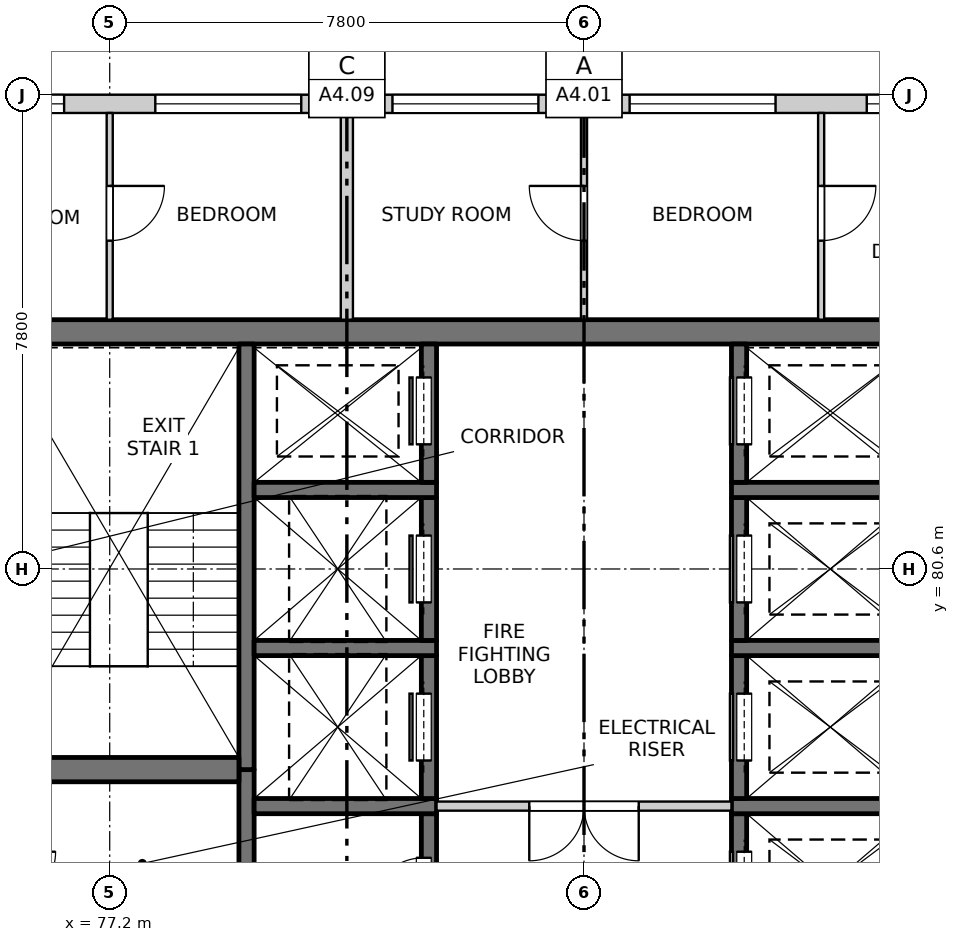
"""IFC4 building model, lengths in metres.
Left out: names, types, materials, properties, quantities, classifications, styles, units other than length and angle.
Written with IfcOpenShell. Run it as: python <this file> out.ifc"""

import sys

from ifc_helpers import new_model, si_unit, direction, frame, frame_2d, origin, place, context, subcontext, project, spatial, rectangle, extrude, element, fill, save


model = new_model("IFC4")
c1 = context("Model", 3, precision=1e-05, world=origin(), true_north=direction((0.0, 1.0)))
c2 = subcontext(c1, "Body", "Model", "MODEL_VIEW")
j1 = project(units=[si_unit("LENGTHUNIT", "METRE"), si_unit("PLANEANGLEUNIT", "RADIAN")], contexts=[c1])
p1 = place(None, origin())
s1 = spatial("IfcSite", under=j1, at=p1, CompositionType="ELEMENT")
p2 = place(p1, origin())
s2 = spatial("IfcBuilding", under=s1, at=p2, CompositionType="ELEMENT")
p3 = place(p2, frame((0.0, 0.0, 204.1)))
s3 = spatial("IfcBuildingStorey", under=s2, at=p3, CompositionType="ELEMENT", Elevation=204.1)
p4 = place(p3, frame((75.45, 84.5, -0.25), z_axis=(0.0, 0.0, 1.0), x_axis=(1.0, 0.0, 0.0)))
e1 = element("IfcWall", 1, at=p4, inside=s3, PredefinedType="SOLIDWALL", context=c2, shape_type="SweptSolid", body=[
    extrude(rectangle(XDim=19.1, YDim=0.4, at=frame_2d((9.55, 0.0))), origin(), (0.0, 0.0, 1.0), 3.4),
])
p5 = place(p3, frame((79.45, 60.975, -0.25), z_axis=(0.0, 0.0, 1.0), x_axis=(0.0, 1.0, 0.0)))
e2 = element("IfcWall", 2, at=p5, inside=s3, PredefinedType="SOLIDWALL", context=c2, shape_type="SweptSolid", body=[
    extrude(rectangle(XDim=16.325, YDim=0.25, at=frame_2d((8.163, 0.0))), origin(), (0.0, 0.0, 1.0), 3.4),
])
p6 = place(p3, frame((79.45, 77.3, -0.25), z_axis=(0.0, 0.0, 1.0), x_axis=(0.0, 1.0, 0.0)))
e3 = element("IfcWall", 3, at=p6, inside=s3, PredefinedType="SOLIDWALL", context=c2, shape_type="SweptSolid", body=[
    extrude(rectangle(XDim=7.0, YDim=0.25, at=frame_2d((3.5, 0.0))), origin(), (0.0, 0.0, 1.0), 3.4),
])
p7 = place(p3, frame((82.45, 74.225, -0.25), z_axis=(0.0, 0.0, 1.0), x_axis=(0.0, 1.0, 0.0)))
e4 = element("IfcWall", 4, at=p7, inside=s3, PredefinedType="SOLIDWALL", context=c2, shape_type="SweptSolid", body=[
    extrude(rectangle(XDim=2.35, YDim=0.25, at=frame_2d((1.175, 0.0))), origin(), (0.0, 0.0, 1.0), 3.4),
])
p8 = place(p7, frame((0.725, 0.0, 0.25)))
e5 = element("IfcOpeningElement", 5, at=p8, cuts=e4, PredefinedType="OPENING", context=c2, shape_type="SweptSolid", body=[
    extrude(rectangle(XDim=0.9, YDim=2.1, at=frame_2d((0.45, 1.05))), frame((0.0, 0.135, 0.0), z_axis=(0.0, -1.0, 0.0), x_axis=(1.0, 0.0, 0.0)), (0.0, 0.0, 1.0), 0.27),
])
p9 = place(p3, frame((79.575, 76.7, -0.25), z_axis=(0.0, 0.0, 1.0), x_axis=(1.0, 0.0, 0.0)))
e6 = element("IfcWall", 6, at=p9, inside=s3, PredefinedType="SOLIDWALL", context=c2, shape_type="SweptSolid", body=[
    extrude(rectangle(XDim=3.0, YDim=0.25, at=frame_2d((1.5, 0.0))), origin(), (0.0, 0.0, 1.0), 3.4),
])
p10 = place(p3, frame((82.45, 76.825, -0.25), z_axis=(0.0, 0.0, 1.0), x_axis=(0.0, 1.0, 0.0)))
e7 = element("IfcWall", 7, at=p10, inside=s3, PredefinedType="SOLIDWALL", context=c2, shape_type="SweptSolid", body=[
    extrude(rectangle(XDim=2.35, YDim=0.25, at=frame_2d((1.175, 0.0))), origin(), (0.0, 0.0, 1.0), 3.4),
])
p11 = place(p10, frame((0.625, 0.0, 0.25)))
e8 = element("IfcOpeningElement", 8, at=p11, cuts=e7, PredefinedType="OPENING", context=c2, shape_type="SweptSolid", body=[
    extrude(rectangle(XDim=1.1, YDim=2.1, at=frame_2d((0.55, 1.05))), frame((0.0, 0.135, 0.0), z_axis=(0.0, -1.0, 0.0), x_axis=(1.0, 0.0, 0.0)), (0.0, 0.0, 1.0), 0.27),
])
p12 = place(p3, frame((79.575, 79.3, -0.25), z_axis=(0.0, 0.0, 1.0), x_axis=(1.0, 0.0, 0.0)))
e9 = element("IfcWall", 9, at=p12, inside=s3, PredefinedType="SOLIDWALL", context=c2, shape_type="SweptSolid", body=[
    extrude(rectangle(XDim=3.0, YDim=0.25, at=frame_2d((1.5, 0.0))), origin(), (0.0, 0.0, 1.0), 3.4),
])
p13 = place(p3, frame((82.45, 79.425, -0.25), z_axis=(0.0, 0.0, 1.0), x_axis=(0.0, 1.0, 0.0)))
e10 = element("IfcWall", 10, at=p13, inside=s3, PredefinedType="SOLIDWALL", context=c2, shape_type="SweptSolid", body=[
    extrude(rectangle(XDim=2.35, YDim=0.25, at=frame_2d((1.175, 0.0))), origin(), (0.0, 0.0, 1.0), 3.4),
])
p14 = place(p13, frame((0.625, 0.0, 0.25)))
e11 = element("IfcOpeningElement", 11, at=p14, cuts=e10, PredefinedType="OPENING", context=c2, shape_type="SweptSolid", body=[
    extrude(rectangle(XDim=1.1, YDim=2.1, at=frame_2d((0.55, 1.05))), frame((0.0, 0.135, 0.0), z_axis=(0.0, -1.0, 0.0), x_axis=(1.0, 0.0, 0.0)), (0.0, 0.0, 1.0), 0.27),
])
p15 = place(p3, frame((79.575, 81.9, -0.25), z_axis=(0.0, 0.0, 1.0), x_axis=(1.0, 0.0, 0.0)))
e12 = element("IfcWall", 12, at=p15, inside=s3, PredefinedType="SOLIDWALL", context=c2, shape_type="SweptSolid", body=[
    extrude(rectangle(XDim=3.0, YDim=0.25, at=frame_2d((1.5, 0.0))), origin(), (0.0, 0.0, 1.0), 3.4),
])
p16 = place(p3, frame((82.45, 82.025, -0.25), z_axis=(0.0, 0.0, 1.0), x_axis=(0.0, 1.0, 0.0)))
e13 = element("IfcWall", 13, at=p16, inside=s3, PredefinedType="SOLIDWALL", context=c2, shape_type="SweptSolid", body=[
    extrude(rectangle(XDim=2.275, YDim=0.25, at=frame_2d((1.138, 0.0))), origin(), (0.0, 0.0, 1.0), 3.4),
])
p17 = place(p16, frame((0.625, 0.0, 0.25)))
e14 = element("IfcOpeningElement", 14, at=p17, cuts=e13, PredefinedType="OPENING", context=c2, shape_type="SweptSolid", body=[
    extrude(rectangle(XDim=1.1, YDim=2.1, at=frame_2d((0.55, 1.05))), frame((0.0, 0.135, 0.0), z_axis=(0.0, -1.0, 0.0), x_axis=(1.0, 0.0, 0.0)), (0.0, 0.0, 1.0), 0.27),
])
p18 = place(p3, frame((87.55, 74.225, -0.25), z_axis=(0.0, 0.0, 1.0), x_axis=(0.0, 1.0, 0.0)))
e15 = element("IfcWall", 15, at=p18, inside=s3, PredefinedType="SOLIDWALL", context=c2, shape_type="SweptSolid", body=[
    extrude(rectangle(XDim=2.35, YDim=0.25, at=frame_2d((1.175, 0.0))), origin(), (0.0, 0.0, 1.0), 3.4),
])
p19 = place(p18, frame((0.625, 0.0, 0.25)))
e16 = element("IfcOpeningElement", 16, at=p19, cuts=e15, PredefinedType="OPENING", context=c2, shape_type="SweptSolid", body=[
    extrude(rectangle(XDim=1.1, YDim=2.1, at=frame_2d((0.55, 1.05))), frame((0.0, 0.135, 0.0), z_axis=(0.0, -1.0, 0.0), x_axis=(1.0, 0.0, 0.0)), (0.0, 0.0, 1.0), 0.27),
])
p20 = place(p3, frame((87.425, 76.7, -0.25), z_axis=(0.0, 0.0, 1.0), x_axis=(1.0, 0.0, 0.0)))
e17 = element("IfcWall", 17, at=p20, inside=s3, PredefinedType="SOLIDWALL", context=c2, shape_type="SweptSolid", body=[
    extrude(rectangle(XDim=3.0, YDim=0.25, at=frame_2d((1.5, 0.0))), origin(), (0.0, 0.0, 1.0), 3.4),
])
p21 = place(p3, frame((87.55, 76.825, -0.25), z_axis=(0.0, 0.0, 1.0), x_axis=(0.0, 1.0, 0.0)))
e18 = element("IfcWall", 18, at=p21, inside=s3, PredefinedType="SOLIDWALL", context=c2, shape_type="SweptSolid", body=[
    extrude(rectangle(XDim=2.35, YDim=0.25, at=frame_2d((1.175, 0.0))), origin(), (0.0, 0.0, 1.0), 3.4),
])
p22 = place(p21, frame((0.625, 0.0, 0.25)))
e19 = element("IfcOpeningElement", 19, at=p22, cuts=e18, PredefinedType="OPENING", context=c2, shape_type="SweptSolid", body=[
    extrude(rectangle(XDim=1.1, YDim=2.1, at=frame_2d((0.55, 1.05))), frame((0.0, 0.135, 0.0), z_axis=(0.0, -1.0, 0.0), x_axis=(1.0, 0.0, 0.0)), (0.0, 0.0, 1.0), 0.27),
])
p23 = place(p3, frame((87.425, 79.3, -0.25), z_axis=(0.0, 0.0, 1.0), x_axis=(1.0, 0.0, 0.0)))
e20 = element("IfcWall", 20, at=p23, inside=s3, PredefinedType="SOLIDWALL", context=c2, shape_type="SweptSolid", body=[
    extrude(rectangle(XDim=3.0, YDim=0.25, at=frame_2d((1.5, 0.0))), origin(), (0.0, 0.0, 1.0), 3.4),
])
p24 = place(p3, frame((87.55, 79.425, -0.25), z_axis=(0.0, 0.0, 1.0), x_axis=(0.0, 1.0, 0.0)))
e21 = element("IfcWall", 21, at=p24, inside=s3, PredefinedType="SOLIDWALL", context=c2, shape_type="SweptSolid", body=[
    extrude(rectangle(XDim=2.35, YDim=0.25, at=frame_2d((1.175, 0.0))), origin(), (0.0, 0.0, 1.0), 3.4),
])
p25 = place(p24, frame((0.625, 0.0, 0.25)))
e22 = element("IfcOpeningElement", 22, at=p25, cuts=e21, PredefinedType="OPENING", context=c2, shape_type="SweptSolid", body=[
    extrude(rectangle(XDim=1.1, YDim=2.1, at=frame_2d((0.55, 1.05))), frame((0.0, 0.135, 0.0), z_axis=(0.0, -1.0, 0.0), x_axis=(1.0, 0.0, 0.0)), (0.0, 0.0, 1.0), 0.27),
])
p26 = place(p3, frame((87.425, 81.9, -0.25), z_axis=(0.0, 0.0, 1.0), x_axis=(1.0, 0.0, 0.0)))
e23 = element("IfcWall", 23, at=p26, inside=s3, PredefinedType="SOLIDWALL", context=c2, shape_type="SweptSolid", body=[
    extrude(rectangle(XDim=3.0, YDim=0.25, at=frame_2d((1.5, 0.0))), origin(), (0.0, 0.0, 1.0), 3.4),
])
p27 = place(p3, frame((87.55, 82.025, -0.25), z_axis=(0.0, 0.0, 1.0), x_axis=(0.0, 1.0, 0.0)))
e24 = element("IfcWall", 24, at=p27, inside=s3, PredefinedType="SOLIDWALL", context=c2, shape_type="SweptSolid", body=[
    extrude(rectangle(XDim=2.275, YDim=0.25, at=frame_2d((1.138, 0.0))), origin(), (0.0, 0.0, 1.0), 3.4),
])
p28 = place(p27, frame((0.625, 0.0, 0.25)))
e25 = element("IfcOpeningElement", 25, at=p28, cuts=e24, PredefinedType="OPENING", context=c2, shape_type="SweptSolid", body=[
    extrude(rectangle(XDim=1.1, YDim=2.1, at=frame_2d((0.55, 1.05))), frame((0.0, 0.135, 0.0), z_axis=(0.0, -1.0, 0.0), x_axis=(1.0, 0.0, 0.0)), (0.0, 0.0, 1.0), 0.27),
])
p29 = place(p3, frame((75.45, 77.3, -0.25), z_axis=(0.0, 0.0, 1.0), x_axis=(1.0, 0.0, 0.0)))
e26 = element("IfcWall", 26, at=p29, inside=s3, PredefinedType="SOLIDWALL", context=c2, shape_type="SweptSolid", body=[
    extrude(rectangle(XDim=3.875, YDim=0.4, at=frame_2d((1.938, 0.0))), origin(), (0.0, 0.0, 1.0), 3.4),
])
p30 = place(p3, frame((73.7, 88.25, 0.0), z_axis=(0.0, 0.0, 1.0), x_axis=(1.0, 0.0, 0.0)))
e27 = element("IfcWall", 27, at=p30, inside=s3, PredefinedType="SOLIDWALL", context=c2, shape_type="SweptSolid", body=[
    extrude(rectangle(XDim=22.6, YDim=0.3, at=frame_2d((11.3, 0.0))), origin(), (0.0, 0.0, 1.0), 2.7),
])
p31 = place(p30, frame((0.35, 0.0, 0.9)))
e28 = element("IfcOpeningElement", 28, at=p31, cuts=e27, PredefinedType="OPENING", context=c2, shape_type="SweptSolid", body=[
    extrude(rectangle(XDim=2.4, YDim=1.8, at=frame_2d((1.2, 0.9))), frame((0.0, 0.16, 0.0), z_axis=(0.0, -1.0, 0.0), x_axis=(1.0, 0.0, 0.0)), (0.0, 0.0, 1.0), 0.32),
])
p32 = place(p30, frame((4.25, 0.0, 0.9)))
e29 = element("IfcOpeningElement", 29, at=p32, cuts=e27, PredefinedType="OPENING", context=c2, shape_type="SweptSolid", body=[
    extrude(rectangle(XDim=2.4, YDim=1.8, at=frame_2d((1.2, 0.9))), frame((0.0, 0.16, 0.0), z_axis=(0.0, -1.0, 0.0), x_axis=(1.0, 0.0, 0.0)), (0.0, 0.0, 1.0), 0.32),
])
p33 = place(p30, frame((8.15, 0.0, 0.9)))
e30 = element("IfcOpeningElement", 30, at=p33, cuts=e27, PredefinedType="OPENING", context=c2, shape_type="SweptSolid", body=[
    extrude(rectangle(XDim=2.4, YDim=1.8, at=frame_2d((1.2, 0.9))), frame((0.0, 0.16, 0.0), z_axis=(0.0, -1.0, 0.0), x_axis=(1.0, 0.0, 0.0)), (0.0, 0.0, 1.0), 0.32),
])
p34 = place(p30, frame((12.05, 0.0, 0.9)))
e31 = element("IfcOpeningElement", 31, at=p34, cuts=e27, PredefinedType="OPENING", context=c2, shape_type="SweptSolid", body=[
    extrude(rectangle(XDim=2.4, YDim=1.8, at=frame_2d((1.2, 0.9))), frame((0.0, 0.16, 0.0), z_axis=(0.0, -1.0, 0.0), x_axis=(1.0, 0.0, 0.0)), (0.0, 0.0, 1.0), 0.32),
])
p35 = place(p30, frame((15.95, 0.0, 0.9)))
e32 = element("IfcOpeningElement", 32, at=p35, cuts=e27, PredefinedType="OPENING", context=c2, shape_type="SweptSolid", body=[
    extrude(rectangle(XDim=2.4, YDim=1.8, at=frame_2d((1.2, 0.9))), frame((0.0, 0.16, 0.0), z_axis=(0.0, -1.0, 0.0), x_axis=(1.0, 0.0, 0.0)), (0.0, 0.0, 1.0), 0.32),
])
p36 = place(p30, frame((19.85, 0.0, 0.9)))
e33 = element("IfcOpeningElement", 33, at=p36, cuts=e27, PredefinedType="OPENING", context=c2, shape_type="SweptSolid", body=[
    extrude(rectangle(XDim=2.4, YDim=1.8, at=frame_2d((1.2, 0.9))), frame((0.0, 0.16, 0.0), z_axis=(0.0, -1.0, 0.0), x_axis=(1.0, 0.0, 0.0)), (0.0, 0.0, 1.0), 0.32),
])
p37 = place(p3, frame((82.575, 76.7, 0.0), z_axis=(0.0, 0.0, 1.0), x_axis=(1.0, 0.0, 0.0)))
e34 = element("IfcWall", 34, at=p37, inside=s3, PredefinedType="PARTITIONING", context=c2, shape_type="SweptSolid", body=[
    extrude(rectangle(XDim=4.85, YDim=0.15, at=frame_2d((2.425, 0.0))), origin(), (0.0, 0.0, 1.0), 3.15),
])
p38 = place(p37, frame((1.525, 0.0, 0.0)))
e35 = element("IfcOpeningElement", 35, at=p38, cuts=e34, PredefinedType="OPENING", context=c2, shape_type="SweptSolid", body=[
    extrude(rectangle(XDim=1.8, YDim=2.1, at=frame_2d((0.9, 1.05))), frame((0.0, 0.085, 0.0), z_axis=(0.0, -1.0, 0.0), x_axis=(1.0, 0.0, 0.0)), (0.0, 0.0, 1.0), 0.17),
])
p39 = place(p3, frame((77.2, 84.7, 0.0), z_axis=(0.0, 0.0, 1.0), x_axis=(0.0, 1.0, 0.0)))
e36 = element("IfcWall", 36, at=p39, inside=s3, PredefinedType="PARTITIONING", context=c2, shape_type="SweptSolid", body=[
    extrude(rectangle(XDim=3.4, YDim=0.1, at=frame_2d((1.7, 0.0))), origin(), (0.0, 0.0, 1.0), 3.15),
])
p40 = place(p39, frame((1.3, 0.0, 0.0)))
e37 = element("IfcOpeningElement", 37, at=p40, cuts=e36, PredefinedType="OPENING", context=c2, shape_type="SweptSolid", body=[
    extrude(rectangle(XDim=0.9, YDim=2.1, at=frame_2d((0.45, 1.05))), frame((0.0, 0.06, 0.0), z_axis=(0.0, -1.0, 0.0), x_axis=(1.0, 0.0, 0.0)), (0.0, 0.0, 1.0), 0.12),
])
p41 = place(p3, frame((81.1, 84.7, 0.0), z_axis=(0.0, 0.0, 1.0), x_axis=(0.0, 1.0, 0.0)))
e38 = element("IfcWall", 38, at=p41, inside=s3, PredefinedType="PARTITIONING", context=c2, shape_type="SweptSolid", body=[
    extrude(rectangle(XDim=3.4, YDim=0.2, at=frame_2d((1.7, 0.0))), origin(), (0.0, 0.0, 1.0), 3.15),
])
p42 = place(p3, frame((85.0, 84.7, 0.0), z_axis=(0.0, 0.0, 1.0), x_axis=(0.0, 1.0, 0.0)))
e39 = element("IfcWall", 39, at=p42, inside=s3, PredefinedType="PARTITIONING", context=c2, shape_type="SweptSolid", body=[
    extrude(rectangle(XDim=3.4, YDim=0.1, at=frame_2d((1.7, 0.0))), origin(), (0.0, 0.0, 1.0), 3.15),
])
p43 = place(p42, frame((1.3, 0.0, 0.0)))
e40 = element("IfcOpeningElement", 40, at=p43, cuts=e39, PredefinedType="OPENING", context=c2, shape_type="SweptSolid", body=[
    extrude(rectangle(XDim=0.9, YDim=2.1, at=frame_2d((0.45, 1.05))), frame((0.0, 0.06, 0.0), z_axis=(0.0, -1.0, 0.0), x_axis=(1.0, 0.0, 0.0)), (0.0, 0.0, 1.0), 0.12),
])
p44 = place(p3, frame((88.9, 84.7, 0.0), z_axis=(0.0, 0.0, 1.0), x_axis=(0.0, 1.0, 0.0)))
e41 = element("IfcWall", 41, at=p44, inside=s3, PredefinedType="PARTITIONING", context=c2, shape_type="SweptSolid", body=[
    extrude(rectangle(XDim=3.4, YDim=0.1, at=frame_2d((1.7, 0.0))), origin(), (0.0, 0.0, 1.0), 3.15),
])
p45 = place(p44, frame((1.3, 0.0, 0.0)))
e42 = element("IfcOpeningElement", 42, at=p45, cuts=e41, PredefinedType="OPENING", context=c2, shape_type="SweptSolid", body=[
    extrude(rectangle(XDim=0.9, YDim=2.1, at=frame_2d((0.45, 1.05))), frame((0.0, 0.06, 0.0), z_axis=(0.0, -1.0, 0.0), x_axis=(1.0, 0.0, 0.0)), (0.0, 0.0, 1.0), 0.12),
])
p46 = place(p31, origin())
e43 = element("IfcWindow", 43, at=p46, inside=s3, PartitioningType="DOUBLE_PANEL_VERTICAL", PredefinedType="WINDOW", context=c2, shape_type="SweptSolid", body=[
    extrude(rectangle(XDim=2.4, YDim=1.8, at=frame_2d((1.2, 0.9))), frame((0.0, 0.03, 0.0), z_axis=(0.0, -1.0, 0.0), x_axis=(1.0, 0.0, 0.0)), (0.0, 0.0, 1.0), 0.06),
])
fill(e28, e43)
p47 = place(p32, origin())
e44 = element("IfcWindow", 44, at=p47, inside=s3, PartitioningType="DOUBLE_PANEL_VERTICAL", PredefinedType="WINDOW", context=c2, shape_type="SweptSolid", body=[
    extrude(rectangle(XDim=2.4, YDim=1.8, at=frame_2d((1.2, 0.9))), frame((0.0, 0.03, 0.0), z_axis=(0.0, -1.0, 0.0), x_axis=(1.0, 0.0, 0.0)), (0.0, 0.0, 1.0), 0.06),
])
fill(e29, e44)
p48 = place(p33, origin())
e45 = element("IfcWindow", 45, at=p48, inside=s3, PartitioningType="DOUBLE_PANEL_VERTICAL", PredefinedType="WINDOW", context=c2, shape_type="SweptSolid", body=[
    extrude(rectangle(XDim=2.4, YDim=1.8, at=frame_2d((1.2, 0.9))), frame((0.0, 0.03, 0.0), z_axis=(0.0, -1.0, 0.0), x_axis=(1.0, 0.0, 0.0)), (0.0, 0.0, 1.0), 0.06),
])
fill(e30, e45)
p49 = place(p34, origin())
e46 = element("IfcWindow", 46, at=p49, inside=s3, PartitioningType="DOUBLE_PANEL_VERTICAL", PredefinedType="WINDOW", context=c2, shape_type="SweptSolid", body=[
    extrude(rectangle(XDim=2.4, YDim=1.8, at=frame_2d((1.2, 0.9))), frame((0.0, 0.03, 0.0), z_axis=(0.0, -1.0, 0.0), x_axis=(1.0, 0.0, 0.0)), (0.0, 0.0, 1.0), 0.06),
])
fill(e31, e46)
p50 = place(p35, origin())
e47 = element("IfcWindow", 47, at=p50, inside=s3, PartitioningType="DOUBLE_PANEL_VERTICAL", PredefinedType="WINDOW", context=c2, shape_type="SweptSolid", body=[
    extrude(rectangle(XDim=2.4, YDim=1.8, at=frame_2d((1.2, 0.9))), frame((0.0, 0.03, 0.0), z_axis=(0.0, -1.0, 0.0), x_axis=(1.0, 0.0, 0.0)), (0.0, 0.0, 1.0), 0.06),
])
fill(e32, e47)
p51 = place(p8, origin())
e48 = element("IfcDoor", 48, at=p51, inside=s3, OperationType="SINGLE_SWING_LEFT", PredefinedType="DOOR", context=c2, shape_type="SweptSolid", body=[
    extrude(rectangle(XDim=0.9, YDim=2.1, at=frame_2d((0.45, 1.05))), frame((0.0, 0.11, 0.0), z_axis=(0.0, -1.0, 0.0), x_axis=(1.0, 0.0, 0.0)), (0.0, 0.0, 1.0), 0.05),
])
fill(e5, e48)
p52 = place(p19, origin())
e49 = element("IfcDoor", 49, at=p52, inside=s3, OperationType="SLIDING_TO_LEFT", PredefinedType="DOOR", context=c2, shape_type="SweptSolid", body=[
    extrude(rectangle(XDim=1.1, YDim=2.1, at=frame_2d((0.55, 1.05))), frame((0.0, -0.06, 0.0), z_axis=(0.0, -1.0, 0.0), x_axis=(1.0, 0.0, 0.0)), (0.0, 0.0, 1.0), 0.05),
])
fill(e16, e49)
p53 = place(p38, origin())
e50 = element("IfcDoor", 50, at=p53, inside=s3, OperationType="DOUBLE_DOOR_SINGLE_SWING", PredefinedType="DOOR", context=c2, shape_type="SweptSolid", body=[
    extrude(rectangle(XDim=1.8, YDim=2.1, at=frame_2d((0.9, 1.05))), frame((0.0, 0.025, 0.0), z_axis=(0.0, -1.0, 0.0), x_axis=(1.0, 0.0, 0.0)), (0.0, 0.0, 1.0), 0.05),
])
fill(e35, e50)
p54 = place(p11, origin())
e51 = element("IfcDoor", 51, at=p54, inside=s3, OperationType="SLIDING_TO_LEFT", PredefinedType="DOOR", context=c2, shape_type="SweptSolid", body=[
    extrude(rectangle(XDim=1.1, YDim=2.1, at=frame_2d((0.55, 1.05))), frame((0.0, 0.11, 0.0), z_axis=(0.0, -1.0, 0.0), x_axis=(1.0, 0.0, 0.0)), (0.0, 0.0, 1.0), 0.05),
])
fill(e8, e51)
p55 = place(p22, origin())
e52 = element("IfcDoor", 52, at=p55, inside=s3, OperationType="SLIDING_TO_LEFT", PredefinedType="DOOR", context=c2, shape_type="SweptSolid", body=[
    extrude(rectangle(XDim=1.1, YDim=2.1, at=frame_2d((0.55, 1.05))), frame((0.0, -0.06, 0.0), z_axis=(0.0, -1.0, 0.0), x_axis=(1.0, 0.0, 0.0)), (0.0, 0.0, 1.0), 0.05),
])
fill(e19, e52)
p56 = place(p14, origin())
e53 = element("IfcDoor", 53, at=p56, inside=s3, OperationType="SLIDING_TO_LEFT", PredefinedType="DOOR", context=c2, shape_type="SweptSolid", body=[
    extrude(rectangle(XDim=1.1, YDim=2.1, at=frame_2d((0.55, 1.05))), frame((0.0, 0.11, 0.0), z_axis=(0.0, -1.0, 0.0), x_axis=(1.0, 0.0, 0.0)), (0.0, 0.0, 1.0), 0.05),
])
fill(e11, e53)
p57 = place(p25, origin())
e54 = element("IfcDoor", 54, at=p57, inside=s3, OperationType="SLIDING_TO_RIGHT", PredefinedType="DOOR", context=c2, shape_type="SweptSolid", body=[
    extrude(rectangle(XDim=1.1, YDim=2.1, at=frame_2d((0.55, 1.05))), frame((0.0, -0.06, 0.0), z_axis=(0.0, -1.0, 0.0), x_axis=(1.0, 0.0, 0.0)), (0.0, 0.0, 1.0), 0.05),
])
fill(e22, e54)
p58 = place(p17, origin())
e55 = element("IfcDoor", 55, at=p58, inside=s3, OperationType="SLIDING_TO_RIGHT", PredefinedType="DOOR", context=c2, shape_type="SweptSolid", body=[
    extrude(rectangle(XDim=1.1, YDim=2.1, at=frame_2d((0.55, 1.05))), frame((0.0, 0.11, 0.0), z_axis=(0.0, -1.0, 0.0), x_axis=(1.0, 0.0, 0.0)), (0.0, 0.0, 1.0), 0.05),
])
fill(e14, e55)
p59 = place(p28, origin())
e56 = element("IfcDoor", 56, at=p59, inside=s3, OperationType="SLIDING_TO_RIGHT", PredefinedType="DOOR", context=c2, shape_type="SweptSolid", body=[
    extrude(rectangle(XDim=1.1, YDim=2.1, at=frame_2d((0.55, 1.05))), frame((0.0, -0.06, 0.0), z_axis=(0.0, -1.0, 0.0), x_axis=(1.0, 0.0, 0.0)), (0.0, 0.0, 1.0), 0.05),
])
fill(e25, e56)
p60 = place(p40, origin())
e57 = element("IfcDoor", 57, at=p60, inside=s3, OperationType="SINGLE_SWING_LEFT", PredefinedType="DOOR", context=c2, shape_type="SweptSolid", body=[
    extrude(rectangle(XDim=0.9, YDim=2.1, at=frame_2d((0.45, 1.05))), frame((0.0, 0.025, 0.0), z_axis=(0.0, -1.0, 0.0), x_axis=(1.0, 0.0, 0.0)), (0.0, 0.0, 1.0), 0.05),
])
fill(e37, e57)
p61 = place(p43, origin())
e58 = element("IfcDoor", 58, at=p61, inside=s3, OperationType="SINGLE_SWING_RIGHT", PredefinedType="DOOR", context=c2, shape_type="SweptSolid", body=[
    extrude(rectangle(XDim=0.9, YDim=2.1, at=frame_2d((0.45, 1.05))), frame((0.0, 0.025, 0.0), z_axis=(0.0, -1.0, 0.0), x_axis=(1.0, 0.0, 0.0)), (0.0, 0.0, 1.0), 0.05),
])
fill(e40, e58)
p62 = place(p45, origin())
e59 = element("IfcDoor", 59, at=p62, inside=s3, OperationType="SINGLE_SWING_LEFT", PredefinedType="DOOR", context=c2, shape_type="SweptSolid", body=[
    extrude(rectangle(XDim=0.9, YDim=2.1, at=frame_2d((0.45, 1.05))), frame((0.0, 0.025, 0.0), z_axis=(0.0, -1.0, 0.0), x_axis=(1.0, 0.0, 0.0)), (0.0, 0.0, 1.0), 0.05),
])
fill(e42, e59)
save(model, sys.argv[1])
